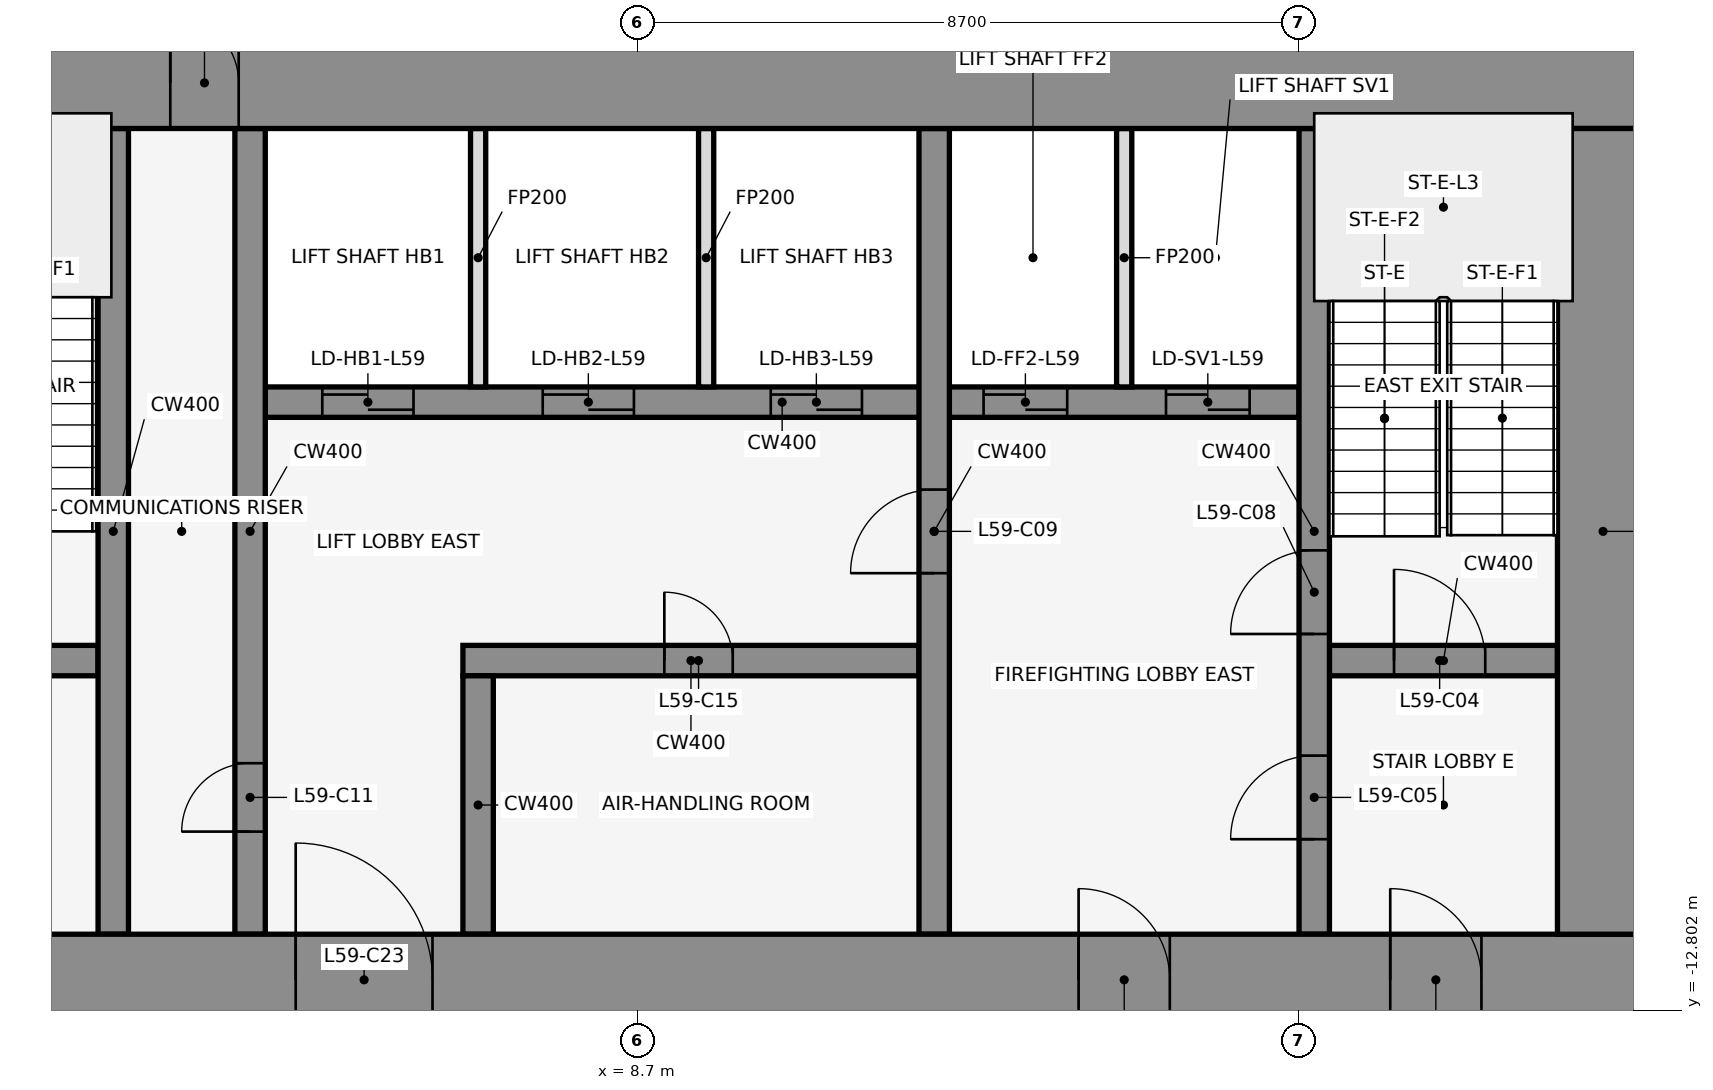
"""IFC4 building model, lengths in metres.
Left out: names, types, materials, properties, quantities, classifications, styles, units other than length and angle.
Written with IfcOpenShell. Run it as: python <this file> out.ifc"""

import sys

from ifc_helpers import new_model, si_unit, direction, frame, frame_2d, origin, place, context, subcontext, project, spatial, rectangle, extrude, element, fill, save


model = new_model("IFC4")
c1 = context("Model", 3, precision=1e-05, world=origin(), true_north=direction((0.0, 1.0)))
c2 = subcontext(c1, "Body", "Model", "MODEL_VIEW")
j1 = project(units=[si_unit("LENGTHUNIT", "METRE"), si_unit("PLANEANGLEUNIT", "RADIAN")], contexts=[c1])
p1 = place(None, origin())
s1 = spatial("IfcSite", under=j1, at=p1, CompositionType="ELEMENT")
p2 = place(p1, origin())
s2 = spatial("IfcBuilding", under=s1, at=p2, CompositionType="ELEMENT")
p3 = place(p2, frame((0.0, 0.0, 262.4)))
s3 = spatial("IfcBuildingStorey", under=s2, at=p3, CompositionType="ELEMENT", Elevation=262.4)
for number, where, z_axis, x_axis in (
    (1, (16.432, -0.105, 0.0), (0.0, 0.0, 1.0), (-0.84, 0.543, 0.0)),
    (2, (1.901, 1.08, 0.0), (0.0, 0.0, 1.0), (-0.84, -0.543, 0.0)),
):
    element("IfcWall", number, at=place(p3, frame(where, z_axis=z_axis, x_axis=x_axis)), inside=s3, PredefinedType="STANDARD", context=c2, shape_type="SweptSolid", body=[
        extrude(rectangle(XDim=2.183, YDim=0.25, at=frame_2d((1.091, 0.0))), origin(), (0.0, 0.0, 1.0), 4.05),
    ])
p4 = place(p3, frame((-1.6, -8.2, 0.0), z_axis=(0.0, 0.0, 1.0), x_axis=(1.0, 0.0, 0.0)))
e3 = element("IfcWall", 3, at=p4, inside=s3, PredefinedType="SHEAR", context=c2, shape_type="SweptSolid", body=[
    extrude(rectangle(XDim=3.2, YDim=0.4, at=frame_2d((1.6, 0.0))), origin(), (0.0, 0.0, 1.0), 4.2),
])
p5 = place(p4, frame((1.05, 0.0, 0.0)))
e4 = element("IfcOpeningElement", 4, at=p5, cuts=e3, PredefinedType="OPENING", context=c2, shape_type="SweptSolid", body=[
    extrude(rectangle(XDim=1.2, YDim=2.1, at=frame_2d((0.6, 1.05))), frame((0.0, 0.212, 0.0), z_axis=(0.0, -1.0, 0.0), x_axis=(1.0, 0.0, 0.0)), (0.0, 0.0, 1.0), 0.424),
])
p6 = place(p3, frame((6.4, -8.2, 0.0), z_axis=(0.0, 0.0, 1.0), x_axis=(1.0, 0.0, 0.0)))
e5 = element("IfcWall", 5, at=p6, inside=s3, PredefinedType="SHEAR", context=c2, shape_type="SweptSolid", body=[
    extrude(rectangle(XDim=6.0, YDim=0.4, at=frame_2d((3.0, 0.0))), origin(), (0.0, 0.0, 1.0), 4.2),
])
p7 = place(p6, frame((2.65, 0.0, 0.0)))
e6 = element("IfcOpeningElement", 6, at=p7, cuts=e5, PredefinedType="OPENING", context=c2, shape_type="SweptSolid", body=[
    extrude(rectangle(XDim=0.9, YDim=2.1, at=frame_2d((0.45, 1.05))), frame((0.0, 0.212, 0.0), z_axis=(0.0, -1.0, 0.0), x_axis=(1.0, 0.0, 0.0)), (0.0, 0.0, 1.0), 0.424),
])
p8 = place(p3, frame((17.8, -8.2, 0.0), z_axis=(0.0, 0.0, 1.0), x_axis=(1.0, 0.0, 0.0)))
e7 = element("IfcWall", 7, at=p8, inside=s3, PredefinedType="SHEAR", context=c2, shape_type="SweptSolid", body=[
    extrude(rectangle(XDim=3.0, YDim=0.4, at=frame_2d((1.5, 0.0))), origin(), (0.0, 0.0, 1.0), 4.2),
])
p9 = place(p8, frame((0.85, 0.0, 0.0)))
e8 = element("IfcOpeningElement", 8, at=p9, cuts=e7, PredefinedType="OPENING", context=c2, shape_type="SweptSolid", body=[
    extrude(rectangle(XDim=1.2, YDim=2.1, at=frame_2d((0.6, 1.05))), frame((0.0, 0.212, 0.0), z_axis=(0.0, -1.0, 0.0), x_axis=(1.0, 0.0, 0.0)), (0.0, 0.0, 1.0), 0.424),
])
p10 = place(p3, frame((3.8, -4.8, 0.0), z_axis=(0.0, 0.0, 1.0), x_axis=(1.0, 0.0, 0.0)))
e9 = element("IfcWall", 9, at=p10, inside=s3, PredefinedType="SHEAR", context=c2, shape_type="SweptSolid", body=[
    extrude(rectangle(XDim=13.6, YDim=0.4, at=frame_2d((6.8, 0.0))), origin(), (0.0, 0.0, 1.0), 4.2),
])
p11 = place(p10, frame((0.75, 0.0, 0.0)))
e10 = element("IfcOpeningElement", 10, at=p11, cuts=e9, PredefinedType="OPENING", context=c2, shape_type="SweptSolid", body=[
    extrude(rectangle(XDim=1.2, YDim=2.1, at=frame_2d((0.6, 1.05))), frame((0.0, 0.212, 0.0), z_axis=(0.0, -1.0, 0.0), x_axis=(1.0, 0.0, 0.0)), (0.0, 0.0, 1.0), 0.424),
])
p12 = place(p10, frame((3.65, 0.0, 0.0)))
e11 = element("IfcOpeningElement", 11, at=p12, cuts=e9, PredefinedType="OPENING", context=c2, shape_type="SweptSolid", body=[
    extrude(rectangle(XDim=1.2, YDim=2.1, at=frame_2d((0.6, 1.05))), frame((0.0, 0.212, 0.0), z_axis=(0.0, -1.0, 0.0), x_axis=(1.0, 0.0, 0.0)), (0.0, 0.0, 1.0), 0.424),
])
p13 = place(p10, frame((6.65, 0.0, 0.0)))
e12 = element("IfcOpeningElement", 12, at=p13, cuts=e9, PredefinedType="OPENING", context=c2, shape_type="SweptSolid", body=[
    extrude(rectangle(XDim=1.2, YDim=2.1, at=frame_2d((0.6, 1.05))), frame((0.0, 0.212, 0.0), z_axis=(0.0, -1.0, 0.0), x_axis=(1.0, 0.0, 0.0)), (0.0, 0.0, 1.0), 0.424),
])
p14 = place(p10, frame((9.45, 0.0, 0.0)))
e13 = element("IfcOpeningElement", 13, at=p14, cuts=e9, PredefinedType="OPENING", context=c2, shape_type="SweptSolid", body=[
    extrude(rectangle(XDim=1.1, YDim=2.1, at=frame_2d((0.55, 1.05))), frame((0.0, 0.212, 0.0), z_axis=(0.0, -1.0, 0.0), x_axis=(1.0, 0.0, 0.0)), (0.0, 0.0, 1.0), 0.424),
])
p15 = place(p10, frame((11.85, 0.0, 0.0)))
e14 = element("IfcOpeningElement", 14, at=p15, cuts=e9, PredefinedType="OPENING", context=c2, shape_type="SweptSolid", body=[
    extrude(rectangle(XDim=1.1, YDim=2.1, at=frame_2d((0.55, 1.05))), frame((0.0, 0.212, 0.0), z_axis=(0.0, -1.0, 0.0), x_axis=(1.0, 0.0, 0.0)), (0.0, 0.0, 1.0), 0.424),
])
p16 = place(p3, frame((1.8, -11.8, 0.0), z_axis=(0.0, 0.0, 1.0), x_axis=(0.0, 1.0, 0.0)))
e15 = element("IfcWall", 15, at=p16, inside=s3, PredefinedType="SHEAR", context=c2, shape_type="SweptSolid", body=[
    extrude(rectangle(XDim=10.6, YDim=0.4, at=frame_2d((5.3, 0.0))), origin(), (0.0, 0.0, 1.0), 4.2),
])
p17 = place(p3, frame((3.6, -11.8, 0.0), z_axis=(0.0, 0.0, 1.0), x_axis=(0.0, 1.0, 0.0)))
e16 = element("IfcWall", 16, at=p17, inside=s3, PredefinedType="SHEAR", context=c2, shape_type="SweptSolid", body=[
    extrude(rectangle(XDim=10.6, YDim=0.4, at=frame_2d((5.3, 0.0))), origin(), (0.0, 0.0, 1.0), 4.2),
])
p18 = place(p17, frame((1.35, 0.0, 0.0)))
e17 = element("IfcOpeningElement", 17, at=p18, cuts=e16, PredefinedType="OPENING", context=c2, shape_type="SweptSolid", body=[
    extrude(rectangle(XDim=0.9, YDim=2.1, at=frame_2d((0.45, 1.05))), frame((0.0, 0.212, 0.0), z_axis=(0.0, -1.0, 0.0), x_axis=(1.0, 0.0, 0.0)), (0.0, 0.0, 1.0), 0.424),
])
p19 = place(p3, frame((6.6, -11.8, 0.0), z_axis=(0.0, 0.0, 1.0), x_axis=(0.0, 1.0, 0.0)))
e18 = element("IfcWall", 18, at=p19, inside=s3, PredefinedType="SHEAR", context=c2, shape_type="SweptSolid", body=[
    extrude(rectangle(XDim=3.4, YDim=0.4, at=frame_2d((1.7, 0.0))), origin(), (0.0, 0.0, 1.0), 4.2),
])
for number, where, z_axis, x_axis in (
    (19, (6.6, -4.6, 0.0), (0.0, 0.0, 1.0), (0.0, 1.0, 0.0)),
    (20, (9.6, -4.6, 0.0), (0.0, 0.0, 1.0), (0.0, 1.0, 0.0)),
):
    element("IfcWall", number, at=place(p3, frame(where, z_axis=z_axis, x_axis=x_axis)), inside=s3, PredefinedType="PARTITIONING", context=c2, shape_type="SweptSolid", body=[
        extrude(rectangle(XDim=3.4, YDim=0.2, at=frame_2d((1.7, 0.0))), origin(), (0.0, 0.0, 1.0), 3.118),
    ])
p20 = place(p3, frame((12.6, -11.8, 0.0), z_axis=(0.0, 0.0, 1.0), x_axis=(0.0, 1.0, 0.0)))
e21 = element("IfcWall", 21, at=p20, inside=s3, PredefinedType="SHEAR", context=c2, shape_type="SweptSolid", body=[
    extrude(rectangle(XDim=10.6, YDim=0.4, at=frame_2d((5.3, 0.0))), origin(), (0.0, 0.0, 1.0), 4.2),
])
p21 = place(p20, frame((4.75, 0.0, 0.0)))
e22 = element("IfcOpeningElement", 22, at=p21, cuts=e21, PredefinedType="OPENING", context=c2, shape_type="SweptSolid", body=[
    extrude(rectangle(XDim=1.1, YDim=2.1, at=frame_2d((0.55, 1.05))), frame((0.0, 0.212, 0.0), z_axis=(0.0, -1.0, 0.0), x_axis=(1.0, 0.0, 0.0)), (0.0, 0.0, 1.0), 0.424),
])
p22 = place(p3, frame((15.1, -4.6, 0.0), z_axis=(0.0, 0.0, 1.0), x_axis=(0.0, 1.0, 0.0)))
e23 = element("IfcWall", 23, at=p22, inside=s3, PredefinedType="PARTITIONING", context=c2, shape_type="SweptSolid", body=[
    extrude(rectangle(XDim=3.4, YDim=0.2, at=frame_2d((1.7, 0.0))), origin(), (0.0, 0.0, 1.0), 3.118),
])
p23 = place(p3, frame((17.6, -11.8, 0.0), z_axis=(0.0, 0.0, 1.0), x_axis=(0.0, 1.0, 0.0)))
e24 = element("IfcWall", 24, at=p23, inside=s3, PredefinedType="SHEAR", context=c2, shape_type="SweptSolid", body=[
    extrude(rectangle(XDim=10.6, YDim=0.4, at=frame_2d((5.3, 0.0))), origin(), (0.0, 0.0, 1.0), 4.2),
])
p24 = place(p23, frame((1.25, 0.0, 0.0)))
e25 = element("IfcOpeningElement", 25, at=p24, cuts=e24, PredefinedType="OPENING", context=c2, shape_type="SweptSolid", body=[
    extrude(rectangle(XDim=1.1, YDim=2.1, at=frame_2d((0.55, 1.05))), frame((0.0, 0.212, 0.0), z_axis=(0.0, -1.0, 0.0), x_axis=(1.0, 0.0, 0.0)), (0.0, 0.0, 1.0), 0.424),
])
p25 = place(p23, frame((3.95, 0.0, 0.0)))
e26 = element("IfcOpeningElement", 26, at=p25, cuts=e24, PredefinedType="OPENING", context=c2, shape_type="SweptSolid", body=[
    extrude(rectangle(XDim=1.1, YDim=2.1, at=frame_2d((0.55, 1.05))), frame((0.0, 0.212, 0.0), z_axis=(0.0, -1.0, 0.0), x_axis=(1.0, 0.0, 0.0)), (0.0, 0.0, 1.0), 0.424),
])
p26 = place(p3, frame((-22.0, -0.6, 0.0), z_axis=(0.0, 0.0, 1.0), x_axis=(1.0, 0.0, 0.0)))
e27 = element("IfcWall", 27, at=p26, inside=s3, PredefinedType="SHEAR", context=c2, shape_type="SweptSolid", body=[
    extrude(rectangle(XDim=44.0, YDim=1.2, at=frame_2d((22.0, 0.0))), origin(), (0.0, 0.0, 1.0), 4.2),
])
p27 = place(p26, frame((18.55, 0.0, 0.0)))
e28 = element("IfcOpeningElement", 28, at=p27, cuts=e27, PredefinedType="OPENING", context=c2, shape_type="SweptSolid", body=[
    extrude(rectangle(XDim=0.9, YDim=2.1, at=frame_2d((0.45, 1.05))), frame((0.0, 0.612, 0.0), z_axis=(0.0, -1.0, 0.0), x_axis=(1.0, 0.0, 0.0)), (0.0, 0.0, 1.0), 1.224),
])
p28 = place(p26, frame((24.55, 0.0, 0.0)))
e29 = element("IfcOpeningElement", 29, at=p28, cuts=e27, PredefinedType="OPENING", context=c2, shape_type="SweptSolid", body=[
    extrude(rectangle(XDim=0.9, YDim=2.1, at=frame_2d((0.45, 1.05))), frame((0.0, 0.612, 0.0), z_axis=(0.0, -1.0, 0.0), x_axis=(1.0, 0.0, 0.0)), (0.0, 0.0, 1.0), 1.224),
])
p29 = place(p3, frame((-22.0, -12.4, 0.0), z_axis=(0.0, 0.0, 1.0), x_axis=(1.0, 0.0, 0.0)))
e30 = element("IfcWall", 30, at=p29, inside=s3, PredefinedType="SHEAR", context=c2, shape_type="SweptSolid", body=[
    extrude(rectangle(XDim=44.0, YDim=1.2, at=frame_2d((22.0, 0.0))), origin(), (0.0, 0.0, 1.0), 4.2),
])
p30 = place(p29, frame((2.2, 0.0, 0.0)))
e31 = element("IfcOpeningElement", 31, at=p30, cuts=e30, PredefinedType="OPENING", context=c2, shape_type="SweptSolid", body=[
    extrude(rectangle(XDim=1.2, YDim=2.1, at=frame_2d((0.6, 1.05))), frame((0.0, 0.612, 0.0), z_axis=(0.0, -1.0, 0.0), x_axis=(1.0, 0.0, 0.0)), (0.0, 0.0, 1.0), 1.224),
])
p31 = place(p29, frame((21.4, 0.0, 0.0)))
e32 = element("IfcOpeningElement", 32, at=p31, cuts=e30, PredefinedType="OPENING", context=c2, shape_type="SweptSolid", body=[
    extrude(rectangle(XDim=1.2, YDim=2.1, at=frame_2d((0.6, 1.05))), frame((0.0, 0.612, 0.0), z_axis=(0.0, -1.0, 0.0), x_axis=(1.0, 0.0, 0.0)), (0.0, 0.0, 1.0), 1.224),
])
p32 = place(p29, frame((40.6, 0.0, 0.0)))
e33 = element("IfcOpeningElement", 33, at=p32, cuts=e30, PredefinedType="OPENING", context=c2, shape_type="SweptSolid", body=[
    extrude(rectangle(XDim=1.2, YDim=2.1, at=frame_2d((0.6, 1.05))), frame((0.0, 0.612, 0.0), z_axis=(0.0, -1.0, 0.0), x_axis=(1.0, 0.0, 0.0)), (0.0, 0.0, 1.0), 1.224),
])
p33 = place(p29, frame((16.0, 0.0, 0.0)))
e34 = element("IfcOpeningElement", 34, at=p33, cuts=e30, PredefinedType="OPENING", context=c2, shape_type="SweptSolid", body=[
    extrude(rectangle(XDim=1.8, YDim=2.1, at=frame_2d((0.9, 1.05))), frame((0.0, 0.612, 0.0), z_axis=(0.0, -1.0, 0.0), x_axis=(1.0, 0.0, 0.0)), (0.0, 0.0, 1.0), 1.224),
])
p34 = place(p29, frame((6.3, 0.0, 0.0)))
e35 = element("IfcOpeningElement", 35, at=p34, cuts=e30, PredefinedType="OPENING", context=c2, shape_type="SweptSolid", body=[
    extrude(rectangle(XDim=1.2, YDim=2.1, at=frame_2d((0.6, 1.05))), frame((0.0, 0.612, 0.0), z_axis=(0.0, -1.0, 0.0), x_axis=(1.0, 0.0, 0.0)), (0.0, 0.0, 1.0), 1.224),
])
p35 = place(p29, frame((26.2, 0.0, 0.0)))
e36 = element("IfcOpeningElement", 36, at=p35, cuts=e30, PredefinedType="OPENING", context=c2, shape_type="SweptSolid", body=[
    extrude(rectangle(XDim=1.8, YDim=2.1, at=frame_2d((0.9, 1.05))), frame((0.0, 0.612, 0.0), z_axis=(0.0, -1.0, 0.0), x_axis=(1.0, 0.0, 0.0)), (0.0, 0.0, 1.0), 1.224),
])
p36 = place(p29, frame((36.5, 0.0, 0.0)))
e37 = element("IfcOpeningElement", 37, at=p36, cuts=e30, PredefinedType="OPENING", context=c2, shape_type="SweptSolid", body=[
    extrude(rectangle(XDim=1.2, YDim=2.1, at=frame_2d((0.6, 1.05))), frame((0.0, 0.612, 0.0), z_axis=(0.0, -1.0, 0.0), x_axis=(1.0, 0.0, 0.0)), (0.0, 0.0, 1.0), 1.224),
])
p37 = place(p3, frame((21.4, -11.8, 0.0), z_axis=(0.0, 0.0, 1.0), x_axis=(0.0, 1.0, 0.0)))
e38 = element("IfcWall", 38, at=p37, inside=s3, PredefinedType="SHEAR", context=c2, shape_type="SweptSolid", body=[
    extrude(rectangle(XDim=10.6, YDim=1.2, at=frame_2d((5.3, 0.0))), origin(), (0.0, 0.0, 1.0), 4.2),
])
p38 = place(p9, origin())
e39 = element("IfcDoor", 39, at=p38, inside=s3, OperationType="SINGLE_SWING_RIGHT", PredefinedType="DOOR", context=c2, shape_type="SweptSolid", body=[
    extrude(rectangle(XDim=1.2, YDim=2.1, at=frame_2d((0.6, 1.05))), frame((0.0, 0.025, 0.0), z_axis=(0.0, -1.0, 0.0), x_axis=(1.0, 0.0, 0.0)), (0.0, 0.0, 1.0), 0.05),
])
fill(e8, e39)
p39 = place(p24, origin())
e40 = element("IfcDoor", 40, at=p39, inside=s3, OperationType="SINGLE_SWING_LEFT", PredefinedType="DOOR", context=c2, shape_type="SweptSolid", body=[
    extrude(rectangle(XDim=1.1, YDim=2.1, at=frame_2d((0.55, 1.05))), frame((0.0, 0.025, 0.0), z_axis=(0.0, -1.0, 0.0), x_axis=(1.0, 0.0, 0.0)), (0.0, 0.0, 1.0), 0.05),
])
fill(e25, e40)
p40 = place(p11, origin())
e41 = element("IfcDoor", 41, at=p40, inside=s3, OperationType="DOUBLE_DOOR_SLIDING", PredefinedType="DOOR", context=c2, shape_type="SweptSolid", body=[
    extrude(rectangle(XDim=1.2, YDim=2.1, at=frame_2d((0.6, 1.05))), frame((0.0, 0.025, 0.0), z_axis=(0.0, -1.0, 0.0), x_axis=(1.0, 0.0, 0.0)), (0.0, 0.0, 1.0), 0.05),
])
fill(e10, e41)
p41 = place(p12, origin())
e42 = element("IfcDoor", 42, at=p41, inside=s3, OperationType="DOUBLE_DOOR_SLIDING", PredefinedType="DOOR", context=c2, shape_type="SweptSolid", body=[
    extrude(rectangle(XDim=1.2, YDim=2.1, at=frame_2d((0.6, 1.05))), frame((0.0, 0.025, 0.0), z_axis=(0.0, -1.0, 0.0), x_axis=(1.0, 0.0, 0.0)), (0.0, 0.0, 1.0), 0.05),
])
fill(e11, e42)
p42 = place(p13, origin())
e43 = element("IfcDoor", 43, at=p42, inside=s3, OperationType="DOUBLE_DOOR_SLIDING", PredefinedType="DOOR", context=c2, shape_type="SweptSolid", body=[
    extrude(rectangle(XDim=1.2, YDim=2.1, at=frame_2d((0.6, 1.05))), frame((0.0, 0.025, 0.0), z_axis=(0.0, -1.0, 0.0), x_axis=(1.0, 0.0, 0.0)), (0.0, 0.0, 1.0), 0.05),
])
fill(e12, e43)
p43 = place(p14, origin())
e44 = element("IfcDoor", 44, at=p43, inside=s3, OperationType="DOUBLE_DOOR_SLIDING", PredefinedType="DOOR", context=c2, shape_type="SweptSolid", body=[
    extrude(rectangle(XDim=1.1, YDim=2.1, at=frame_2d((0.55, 1.05))), frame((0.0, 0.025, 0.0), z_axis=(0.0, -1.0, 0.0), x_axis=(1.0, 0.0, 0.0)), (0.0, 0.0, 1.0), 0.05),
])
fill(e13, e44)
p44 = place(p15, origin())
e45 = element("IfcDoor", 45, at=p44, inside=s3, OperationType="DOUBLE_DOOR_SLIDING", PredefinedType="DOOR", context=c2, shape_type="SweptSolid", body=[
    extrude(rectangle(XDim=1.1, YDim=2.1, at=frame_2d((0.55, 1.05))), frame((0.0, 0.025, 0.0), z_axis=(0.0, -1.0, 0.0), x_axis=(1.0, 0.0, 0.0)), (0.0, 0.0, 1.0), 0.05),
])
fill(e14, e45)
p45 = place(p25, origin())
e46 = element("IfcDoor", 46, at=p45, inside=s3, OperationType="SINGLE_SWING_RIGHT", PredefinedType="DOOR", context=c2, shape_type="SweptSolid", body=[
    extrude(rectangle(XDim=1.1, YDim=2.1, at=frame_2d((0.55, 1.05))), frame((0.0, 0.025, 0.0), z_axis=(0.0, -1.0, 0.0), x_axis=(1.0, 0.0, 0.0)), (0.0, 0.0, 1.0), 0.05),
])
fill(e26, e46)
p46 = place(p21, frame((1.1, 0.0, 0.0), z_axis=(0.0, 0.0, 1.0), x_axis=(-1.0, 0.0, 0.0)))
e47 = element("IfcDoor", 47, at=p46, inside=s3, OperationType="SINGLE_SWING_RIGHT", PredefinedType="DOOR", context=c2, shape_type="SweptSolid", body=[
    extrude(rectangle(XDim=1.1, YDim=2.1, at=frame_2d((0.55, 1.05))), frame((0.0, 0.025, 0.0), z_axis=(0.0, -1.0, 0.0), x_axis=(1.0, 0.0, 0.0)), (0.0, 0.0, 1.0), 0.05),
])
fill(e22, e47)
p47 = place(p18, origin())
e48 = element("IfcDoor", 48, at=p47, inside=s3, OperationType="SINGLE_SWING_LEFT", PredefinedType="DOOR", context=c2, shape_type="SweptSolid", body=[
    extrude(rectangle(XDim=0.9, YDim=2.1, at=frame_2d((0.45, 1.05))), frame((0.0, 0.025, 0.0), z_axis=(0.0, -1.0, 0.0), x_axis=(1.0, 0.0, 0.0)), (0.0, 0.0, 1.0), 0.05),
])
fill(e17, e48)
p48 = place(p7, frame((0.9, 0.0, 0.0), z_axis=(0.0, 0.0, 1.0), x_axis=(-1.0, 0.0, 0.0)))
e49 = element("IfcDoor", 49, at=p48, inside=s3, OperationType="SINGLE_SWING_RIGHT", PredefinedType="DOOR", context=c2, shape_type="SweptSolid", body=[
    extrude(rectangle(XDim=0.9, YDim=2.1, at=frame_2d((0.45, 1.05))), frame((0.0, 0.025, 0.0), z_axis=(0.0, -1.0, 0.0), x_axis=(1.0, 0.0, 0.0)), (0.0, 0.0, 1.0), 0.05),
])
fill(e6, e49)
p49 = place(p28, origin())
e50 = element("IfcDoor", 50, at=p49, inside=s3, OperationType="SINGLE_SWING_LEFT", PredefinedType="DOOR", context=c2, shape_type="SweptSolid", body=[
    extrude(rectangle(XDim=0.9, YDim=2.1, at=frame_2d((0.45, 1.05))), frame((0.0, 0.025, 0.0), z_axis=(0.0, -1.0, 0.0), x_axis=(1.0, 0.0, 0.0)), (0.0, 0.0, 1.0), 0.05),
])
fill(e29, e50)
p50 = place(p32, frame((1.2, 0.0, 0.0), z_axis=(0.0, 0.0, 1.0), x_axis=(-1.0, 0.0, 0.0)))
e51 = element("IfcDoor", 51, at=p50, inside=s3, OperationType="SINGLE_SWING_RIGHT", PredefinedType="DOOR", context=c2, shape_type="SweptSolid", body=[
    extrude(rectangle(XDim=1.2, YDim=2.1, at=frame_2d((0.6, 1.05))), frame((0.0, 0.025, 0.0), z_axis=(0.0, -1.0, 0.0), x_axis=(1.0, 0.0, 0.0)), (0.0, 0.0, 1.0), 0.05),
])
fill(e33, e51)
p51 = place(p35, origin())
e52 = element("IfcDoor", 52, at=p51, inside=s3, OperationType="SINGLE_SWING_LEFT", PredefinedType="DOOR", context=c2, shape_type="SweptSolid", body=[
    extrude(rectangle(XDim=1.8, YDim=2.1, at=frame_2d((0.9, 1.05))), frame((0.0, 0.025, 0.0), z_axis=(0.0, -1.0, 0.0), x_axis=(1.0, 0.0, 0.0)), (0.0, 0.0, 1.0), 0.05),
])
fill(e36, e52)
p52 = place(p36, frame((1.2, 0.0, 0.0), z_axis=(0.0, 0.0, 1.0), x_axis=(-1.0, 0.0, 0.0)))
e53 = element("IfcDoor", 53, at=p52, inside=s3, OperationType="SINGLE_SWING_RIGHT", PredefinedType="DOOR", context=c2, shape_type="SweptSolid", body=[
    extrude(rectangle(XDim=1.2, YDim=2.1, at=frame_2d((0.6, 1.05))), frame((0.0, 0.025, 0.0), z_axis=(0.0, -1.0, 0.0), x_axis=(1.0, 0.0, 0.0)), (0.0, 0.0, 1.0), 0.05),
])
fill(e37, e53)
save(model, sys.argv[1])
